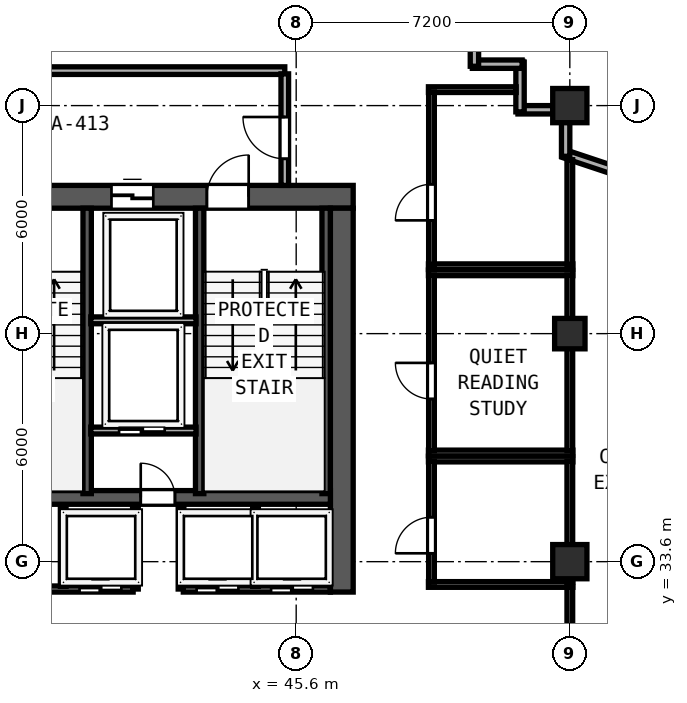
"""IFC4 building model, lengths in metres.
Left out: names, types, materials, properties, quantities, classifications, styles, units other than length and angle.
Written with IfcOpenShell. Run it as: python <this file> out.ifc"""

import sys

from ifc_helpers import new_model, si_unit, direction, frame, frame_2d, origin, origin_2d, place, context, subcontext, project, spatial, rectangle, hollow_rectangle, extrude, element, fill, save


model = new_model("IFC4")
c1 = context("Model", 3, precision=1e-05, world=origin(), true_north=direction((0.0, 1.0)))
c2 = subcontext(c1, "Body", "Model", "MODEL_VIEW")
j1 = project(units=[si_unit("LENGTHUNIT", "METRE"), si_unit("PLANEANGLEUNIT", "RADIAN")], contexts=[c1])
p1 = place(None, origin())
s1 = spatial("IfcSite", under=j1, at=p1, CompositionType="ELEMENT")
p2 = place(p1, origin())
s2 = spatial("IfcBuilding", under=s1, at=p2, CompositionType="ELEMENT")
p3 = place(p2, frame((0.0, 0.0, 191.8)))
s3 = spatial("IfcBuildingStorey", under=s2, at=p3, CompositionType="ELEMENT", Elevation=191.8)
p4 = place(p3, frame((29.7, 43.2, 0.0), z_axis=(0.0, 0.0, 1.0), x_axis=(1.0, 0.0, 0.0)))
e1 = element("IfcWall", 1, at=p4, inside=s3, PredefinedType="SHEAR", context=c2, shape_type="SweptSolid", body=[
    extrude(rectangle(XDim=17.4, YDim=0.6, at=frame_2d((8.7, 0.0))), origin(), (0.0, 0.0, 1.0), 3.62),
])
p5 = place(p4, frame((2.35, 0.0, 0.0)))
e2 = element("IfcOpeningElement", 2, at=p5, cuts=e1, PredefinedType="OPENING", context=c2, shape_type="SweptSolid", body=[
    extrude(rectangle(XDim=1.1, YDim=2.15, at=frame_2d((0.55, 1.075))), frame((0.0, 0.31, 0.0), z_axis=(0.0, -1.0, 0.0), x_axis=(1.0, 0.0, 0.0)), (0.0, 0.0, 1.0), 0.62),
])
p6 = place(p4, frame((7.46, 0.0, 0.0)))
e3 = element("IfcOpeningElement", 3, at=p6, cuts=e1, PredefinedType="OPENING", context=c2, shape_type="SweptSolid", body=[
    extrude(rectangle(XDim=1.1, YDim=2.15, at=frame_2d((0.55, 1.075))), frame((0.0, 0.31, 0.0), z_axis=(0.0, -1.0, 0.0), x_axis=(1.0, 0.0, 0.0)), (0.0, 0.0, 1.0), 0.62),
])
p7 = place(p4, frame((13.55, 0.0, 0.0)))
e4 = element("IfcOpeningElement", 4, at=p7, cuts=e1, PredefinedType="OPENING", context=c2, shape_type="SweptSolid", body=[
    extrude(rectangle(XDim=1.1, YDim=2.15, at=frame_2d((0.55, 1.075))), frame((0.0, 0.31, 0.0), z_axis=(0.0, -1.0, 0.0), x_axis=(1.0, 0.0, 0.0)), (0.0, 0.0, 1.0), 0.62),
])
p8 = place(p4, frame((4.68, 0.0, 0.0)))
e5 = element("IfcOpeningElement", 5, at=p8, cuts=e1, PredefinedType="OPENING", context=c2, shape_type="SweptSolid", body=[
    extrude(rectangle(XDim=1.1, YDim=2.2, at=frame_2d((0.55, 1.1))), frame((0.0, 0.31, 0.0), z_axis=(0.0, -1.0, 0.0), x_axis=(1.0, 0.0, 0.0)), (0.0, 0.0, 1.0), 0.62),
])
p9 = place(p4, frame((11.04, 0.0, 0.0)))
e6 = element("IfcOpeningElement", 6, at=p9, cuts=e1, PredefinedType="OPENING", context=c2, shape_type="SweptSolid", body=[
    extrude(rectangle(XDim=1.1, YDim=2.2, at=frame_2d((0.55, 1.1))), frame((0.0, 0.31, 0.0), z_axis=(0.0, -1.0, 0.0), x_axis=(1.0, 0.0, 0.0)), (0.0, 0.0, 1.0), 0.62),
])
p10 = place(p3, frame((46.8, 32.8, 0.0), z_axis=(0.0, 0.0, 1.0), x_axis=(0.0, 1.0, 0.0)))
e7 = element("IfcWall", 7, at=p10, inside=s3, PredefinedType="SHEAR", context=c2, shape_type="SweptSolid", body=[
    extrude(rectangle(XDim=10.1, YDim=0.6, at=frame_2d((5.05, 0.0))), origin(), (0.0, 0.0, 1.0), 3.62),
])
p11 = place(p3, frame((30.3, 35.29, 0.0), z_axis=(0.0, 0.0, 1.0), x_axis=(1.0, 0.0, 0.0)))
e8 = element("IfcWall", 8, at=p11, inside=s3, PredefinedType="SHEAR", context=c2, shape_type="SweptSolid", body=[
    extrude(rectangle(XDim=16.2, YDim=0.36, at=frame_2d((8.1, 0.0))), origin(), (0.0, 0.0, 1.0), 3.62),
])
p12 = place(p11, frame((5.05, 0.0, 0.0), z_axis=(0.0, 0.0, 1.0), x_axis=(-1.0, 0.0, 0.0)))
e9 = element("IfcOpeningElement", 9, at=p12, cuts=e8, PredefinedType="OPENING", context=c2, shape_type="SweptSolid", body=[
    extrude(rectangle(XDim=0.9, YDim=2.1, at=frame_2d((0.45, 1.05))), frame((0.0, 0.19, 0.0), z_axis=(0.0, -1.0, 0.0), x_axis=(1.0, 0.0, 0.0)), (0.0, 0.0, 1.0), 0.38),
])
p13 = place(p11, frame((12.11, 0.0, 0.0), z_axis=(0.0, 0.0, 1.0), x_axis=(-1.0, 0.0, 0.0)))
e10 = element("IfcOpeningElement", 10, at=p13, cuts=e8, PredefinedType="OPENING", context=c2, shape_type="SweptSolid", body=[
    extrude(rectangle(XDim=0.9, YDim=2.1, at=frame_2d((0.45, 1.05))), frame((0.0, 0.19, 0.0), z_axis=(0.0, -1.0, 0.0), x_axis=(1.0, 0.0, 0.0)), (0.0, 0.0, 1.0), 0.38),
])
for number, where, z_axis, x_axis in (
    (11, (40.1, 35.39, 0.0), (0.0, 0.0, 1.0), (0.0, 1.0, 0.0)),
    (12, (43.06, 35.39, 0.0), (0.0, 0.0, 1.0), (0.0, 1.0, 0.0)),
    (13, (46.388, 35.39, 0.0), (0.0, 0.0, 1.0), (0.0, 1.0, 0.0)),
):
    element("IfcWall", number, at=place(p3, frame(where, z_axis=z_axis, x_axis=x_axis)), inside=s3, PredefinedType="SHEAR", context=c2, shape_type="SweptSolid", body=[
        extrude(rectangle(XDim=7.51, YDim=0.22, at=frame_2d((3.755, 0.0))), origin(), (0.0, 0.0, 1.0), 3.62),
    ])
for number, where, z_axis, x_axis in (
    (14, (52.8, 33.6, 0.0), (0.0, 0.0, 1.0), (1.0, 0.0, 0.0)),
    (15, (52.8, 45.6, 0.0), (0.0, 0.0, 1.0), (1.0, 0.0, 0.0)),
):
    element("IfcColumn", number, at=place(p3, frame(where, z_axis=z_axis, x_axis=x_axis)), inside=s3, PredefinedType="COLUMN", context=c2, shape_type="SweptSolid", body=[
        extrude(hollow_rectangle(XDim=0.9, YDim=0.9, WallThickness=0.034, at=origin_2d()), origin(), (0.0, 0.0, 1.0), 3.8),
    ])
p14 = place(p3, frame((52.8, 39.6, 0.0), z_axis=(0.0, 0.0, 1.0), x_axis=(1.0, 0.0, 0.0)))
e16 = element("IfcColumn", 16, at=p14, inside=s3, PredefinedType="COLUMN", context=c2, shape_type="SweptSolid", body=[
    extrude(hollow_rectangle(XDim=0.8, YDim=0.8, WallThickness=0.03, at=origin_2d()), origin(), (0.0, 0.0, 1.0), 3.8),
])
p15 = place(p3, frame((58.476, 42.392, 0.0), z_axis=(0.0, 0.0, 1.0), x_axis=(-0.948691231611, 0.316203964339, 0.0)))
e17 = element("IfcWall", 17, at=p15, inside=s3, PredefinedType="SOLIDWALL", context=c2, shape_type="SweptSolid", body=[
    extrude(rectangle(XDim=6.154, YDim=0.22, at=frame_2d((3.077, 0.0))), origin(), (0.0, 0.0, 1.0), 3.215),
])
p16 = place(p15, frame((0.419, 0.0, 0.85)))
e18 = element("IfcOpeningElement", 18, at=p16, cuts=e17, PredefinedType="OPENING", context=c2, shape_type="SweptSolid", body=[
    extrude(rectangle(XDim=1.1, YDim=1.75, at=frame_2d((0.55, 0.875))), frame((0.0, 0.12, 0.0), z_axis=(0.0, -1.0, 0.0), x_axis=(1.0, 0.0, 0.0)), (0.0, 0.0, 1.0), 0.24),
])
p17 = place(p3, frame((52.69, 44.266, 0.0), z_axis=(0.0, 0.0, 1.0), x_axis=(0.0, 1.0, 0.0)))
e19 = element("IfcWall", 19, at=p17, inside=s3, PredefinedType="SOLIDWALL", context=c2, shape_type="SweptSolid", body=[
    extrude(rectangle(XDim=0.892, YDim=0.22, at=frame_2d((0.446, 0.0))), origin(), (0.0, 0.0, 1.0), 3.215),
])
p18 = place(p3, frame((52.358, 45.49, 0.0), z_axis=(0.0, 0.0, 1.0), x_axis=(-1.0, 0.0, 0.0)))
e20 = element("IfcWall", 20, at=p18, inside=s3, PredefinedType="SOLIDWALL", context=c2, shape_type="SweptSolid", body=[
    extrude(rectangle(XDim=0.923, YDim=0.22, at=frame_2d((0.461, 0.0))), origin(), (0.0, 0.0, 1.0), 3.62),
])
p19 = place(p3, frame((51.49, 45.435, 0.0), z_axis=(0.0, 0.0, 1.0), x_axis=(0.0, 1.0, 0.0)))
e21 = element("IfcWall", 21, at=p19, inside=s3, PredefinedType="SOLIDWALL", context=c2, shape_type="SweptSolid", body=[
    extrude(rectangle(XDim=1.31, YDim=0.22, at=frame_2d((0.655, 0.0))), origin(), (0.0, 0.0, 1.0), 3.62),
])
p20 = place(p3, frame((51.545, 46.69, 0.0), z_axis=(0.0, 0.0, 1.0), x_axis=(-1.0, 0.0, 0.0)))
e22 = element("IfcWall", 22, at=p20, inside=s3, PredefinedType="SOLIDWALL", context=c2, shape_type="SweptSolid", body=[
    extrude(rectangle(XDim=1.31, YDim=0.22, at=frame_2d((0.655, 0.0))), origin(), (0.0, 0.0, 1.0), 3.62),
])
p21 = place(p3, frame((50.29, 46.635, 0.0), z_axis=(0.0, 0.0, 1.0), x_axis=(0.0, 1.0, 0.0)))
e23 = element("IfcWall", 23, at=p21, inside=s3, PredefinedType="SOLIDWALL", context=c2, shape_type="SweptSolid", body=[
    extrude(rectangle(XDim=1.535, YDim=0.22, at=frame_2d((0.768, 0.0))), origin(), (0.0, 0.0, 1.0), 3.62),
])
p22 = place(p3, frame((31.5, 46.52, 0.0), z_axis=(0.0, 0.0, 1.0), x_axis=(1.0, 0.0, 0.0)))
e24 = element("IfcWall", 24, at=p22, inside=s3, PredefinedType="SOLIDWALL", context=c2, shape_type="SweptSolid", body=[
    extrude(rectangle(XDim=13.8, YDim=0.2, at=frame_2d((6.9, 0.0))), origin(), (0.0, 0.0, 1.0), 3.62),
])
p23 = place(p3, frame((45.3, 43.5, 0.0), z_axis=(0.0, 0.0, 1.0), x_axis=(0.0, 1.0, 0.0)))
e25 = element("IfcWall", 25, at=p23, inside=s3, PredefinedType="SOLIDWALL", context=c2, shape_type="SweptSolid", body=[
    extrude(rectangle(XDim=2.935, YDim=0.2, at=frame_2d((1.468, 0.0))), origin(), (0.0, 0.0, 1.0), 3.62),
])
p24 = place(p23, frame((0.7, 0.0, 0.0)))
e26 = element("IfcOpeningElement", 26, at=p24, cuts=e25, PredefinedType="OPENING", context=c2, shape_type="SweptSolid", body=[
    extrude(rectangle(XDim=1.1, YDim=2.15, at=frame_2d((0.55, 1.075))), frame((0.0, 0.11, 0.0), z_axis=(0.0, -1.0, 0.0), x_axis=(1.0, 0.0, 0.0)), (0.0, 0.0, 1.0), 0.22),
])
p25 = place(p3, frame((40.195, 39.95, 0.0), z_axis=(0.0, 0.0, 1.0), x_axis=(1.0, 0.0, 0.0)))
e27 = element("IfcWall", 27, at=p25, inside=s3, PredefinedType="SOLIDWALL", context=c2, shape_type="SweptSolid", body=[
    extrude(rectangle(XDim=2.77, YDim=0.18, at=frame_2d((1.385, 0.0))), origin(), (0.0, 0.0, 1.0), 3.62),
])
p26 = place(p3, frame((40.195, 37.05, 0.0), z_axis=(0.0, 0.0, 1.0), x_axis=(1.0, 0.0, 0.0)))
e28 = element("IfcWall", 28, at=p26, inside=s3, PredefinedType="SOLIDWALL", context=c2, shape_type="SweptSolid", body=[
    extrude(rectangle(XDim=2.77, YDim=0.18, at=frame_2d((1.385, 0.0))), origin(), (0.0, 0.0, 1.0), 3.62),
])
p27 = place(p26, frame((1.945, 0.0, 0.0), z_axis=(0.0, 0.0, 1.0), x_axis=(-1.0, 0.0, 0.0)))
e29 = element("IfcOpeningElement", 29, at=p27, cuts=e28, PredefinedType="OPENING", context=c2, shape_type="SweptSolid", body=[
    extrude(rectangle(XDim=1.2, YDim=2.2, at=frame_2d((0.6, 1.1))), frame((0.0, 0.1, 0.0), z_axis=(0.0, -1.0, 0.0), x_axis=(1.0, 0.0, 0.0)), (0.0, 0.0, 1.0), 0.2),
])
for number, where, z_axis, x_axis in (
    (30, (41.37, 32.88, 0.0), (0.0, 0.0, 1.0), (0.0, 1.0, 0.0)),
    (31, (42.57, 32.88, 0.0), (0.0, 0.0, 1.0), (0.0, 1.0, 0.0)),
):
    element("IfcWall", number, at=place(p3, frame(where, z_axis=z_axis, x_axis=x_axis)), inside=s3, PredefinedType="SOLIDWALL", context=c2, shape_type="SweptSolid", body=[
        extrude(rectangle(XDim=2.17, YDim=0.15, at=frame_2d((1.085, 0.0))), origin(), (0.0, 0.0, 1.0), 3.62),
    ])
p28 = place(p3, frame((35.57, 32.88, 0.0), z_axis=(0.0, 0.0, 1.0), x_axis=(1.0, 0.0, 0.0)))
e32 = element("IfcWall", 32, at=p28, inside=s3, PredefinedType="SOLIDWALL", context=c2, shape_type="SweptSolid", body=[
    extrude(rectangle(XDim=5.74, YDim=0.16, at=frame_2d((2.87, 0.0))), origin(), (0.0, 0.0, 1.0), 3.62),
])
p29 = place(p28, frame((1.49, 0.0, 0.0), z_axis=(0.0, 0.0, 1.0), x_axis=(-1.0, 0.0, 0.0)))
e33 = element("IfcOpeningElement", 33, at=p29, cuts=e32, PredefinedType="OPENING", context=c2, shape_type="SweptSolid", body=[
    extrude(rectangle(XDim=0.95, YDim=2.12, at=frame_2d((0.475, 1.06))), frame((0.0, 0.09, 0.0), z_axis=(0.0, -1.0, 0.0), x_axis=(1.0, 0.0, 0.0)), (0.0, 0.0, 1.0), 0.18),
])
p30 = place(p28, frame((5.43, 0.0, 0.0), z_axis=(0.0, 0.0, 1.0), x_axis=(-1.0, 0.0, 0.0)))
e34 = element("IfcOpeningElement", 34, at=p30, cuts=e32, PredefinedType="OPENING", context=c2, shape_type="SweptSolid", body=[
    extrude(rectangle(XDim=1.1, YDim=2.2, at=frame_2d((0.55, 1.1))), frame((0.0, 0.09, 0.0), z_axis=(0.0, -1.0, 0.0), x_axis=(1.0, 0.0, 0.0)), (0.0, 0.0, 1.0), 0.18),
])
p31 = place(p3, frame((42.63, 32.88, 0.0), z_axis=(0.0, 0.0, 1.0), x_axis=(1.0, 0.0, 0.0)))
e35 = element("IfcWall", 35, at=p31, inside=s3, PredefinedType="SOLIDWALL", context=c2, shape_type="SweptSolid", body=[
    extrude(rectangle(XDim=3.87, YDim=0.16, at=frame_2d((1.935, 0.0))), origin(), (0.0, 0.0, 1.0), 3.62),
])
p32 = place(p31, frame((1.45, 0.0, 0.0), z_axis=(0.0, 0.0, 1.0), x_axis=(-1.0, 0.0, 0.0)))
e36 = element("IfcOpeningElement", 36, at=p32, cuts=e35, PredefinedType="OPENING", context=c2, shape_type="SweptSolid", body=[
    extrude(rectangle(XDim=1.1, YDim=2.2, at=frame_2d((0.55, 1.1))), frame((0.0, 0.09, 0.0), z_axis=(0.0, -1.0, 0.0), x_axis=(1.0, 0.0, 0.0)), (0.0, 0.0, 1.0), 0.18),
])
p33 = place(p31, frame((3.41, 0.0, 0.0), z_axis=(0.0, 0.0, 1.0), x_axis=(-1.0, 0.0, 0.0)))
e37 = element("IfcOpeningElement", 37, at=p33, cuts=e35, PredefinedType="OPENING", context=c2, shape_type="SweptSolid", body=[
    extrude(rectangle(XDim=1.1, YDim=2.2, at=frame_2d((0.55, 1.1))), frame((0.0, 0.09, 0.0), z_axis=(0.0, -1.0, 0.0), x_axis=(1.0, 0.0, 0.0)), (0.0, 0.0, 1.0), 0.18),
])
for number, where, z_axis, x_axis in (
    (38, (39.47, 32.95, 0.0), (0.0, 0.0, 1.0), (0.0, 1.0, 0.0)),
    (39, (44.53, 32.95, 0.0), (0.0, 0.0, 1.0), (0.0, 1.0, 0.0)),
):
    element("IfcWall", number, at=place(p3, frame(where, z_axis=z_axis, x_axis=x_axis)), inside=s3, PredefinedType="SOLIDWALL", context=c2, shape_type="SweptSolid", body=[
        extrude(rectangle(XDim=2.05, YDim=0.15, at=frame_2d((1.025, 0.0))), origin(), (0.0, 0.0, 1.0), 3.62),
    ])
for number, where, z_axis, x_axis in (
    (40, (49.08, 36.3, 0.0), (0.0, 0.0, 1.0), (1.0, 0.0, 0.0)),
    (41, (49.08, 33.0, 0.0), (0.0, 0.0, 1.0), (1.0, 0.0, 0.0)),
):
    element("IfcWall", number, at=place(p3, frame(where, z_axis=z_axis, x_axis=x_axis)), inside=s3, PredefinedType="PARTITIONING", context=c2, shape_type="SweptSolid", body=[
        extrude(rectangle(XDim=3.8, YDim=0.15, at=frame_2d((1.9, 0.0))), origin(), (0.0, 0.0, 1.0), 3.62),
    ])
p34 = place(p3, frame((49.16, 33.06, 0.0), z_axis=(0.0, 0.0, 1.0), x_axis=(0.0, 1.0, 0.0)))
e42 = element("IfcWall", 42, at=p34, inside=s3, PredefinedType="PARTITIONING", context=c2, shape_type="SweptSolid", body=[
    extrude(rectangle(XDim=3.18, YDim=0.15, at=frame_2d((1.59, 0.0))), origin(), (0.0, 0.0, 1.0), 3.62),
])
p35 = place(p34, frame((0.76, 0.0, 0.0)))
e43 = element("IfcOpeningElement", 43, at=p35, cuts=e42, PredefinedType="OPENING", context=c2, shape_type="SweptSolid", body=[
    extrude(rectangle(XDim=0.95, YDim=2.12, at=frame_2d((0.475, 1.06))), frame((0.0, 0.085, 0.0), z_axis=(0.0, -1.0, 0.0), x_axis=(1.0, 0.0, 0.0)), (0.0, 0.0, 1.0), 0.17),
])
p36 = place(p3, frame((52.8, 33.06, 0.0), z_axis=(0.0, 0.0, 1.0), x_axis=(0.0, 1.0, 0.0)))
e44 = element("IfcWall", 44, at=p36, inside=s3, PredefinedType="PARTITIONING", context=c2, shape_type="SweptSolid", body=[
    extrude(rectangle(XDim=3.18, YDim=0.15, at=frame_2d((1.59, 0.0))), origin(), (0.0, 0.0, 1.0), 3.215),
])
for number, where, z_axis, x_axis in (
    (45, (49.08, 41.2, 0.0), (0.0, 0.0, 1.0), (1.0, 0.0, 0.0)),
    (46, (49.08, 36.46, 0.0), (0.0, 0.0, 1.0), (1.0, 0.0, 0.0)),
):
    element("IfcWall", number, at=place(p3, frame(where, z_axis=z_axis, x_axis=x_axis)), inside=s3, PredefinedType="PARTITIONING", context=c2, shape_type="SweptSolid", body=[
        extrude(rectangle(XDim=3.8, YDim=0.15, at=frame_2d((1.9, 0.0))), origin(), (0.0, 0.0, 1.0), 3.62),
    ])
p37 = place(p3, frame((49.16, 36.52, 0.0), z_axis=(0.0, 0.0, 1.0), x_axis=(0.0, 1.0, 0.0)))
e47 = element("IfcWall", 47, at=p37, inside=s3, PredefinedType="PARTITIONING", context=c2, shape_type="SweptSolid", body=[
    extrude(rectangle(XDim=4.62, YDim=0.15, at=frame_2d((2.31, 0.0))), origin(), (0.0, 0.0, 1.0), 3.62),
])
p38 = place(p37, frame((1.36, 0.0, 0.0)))
e48 = element("IfcOpeningElement", 48, at=p38, cuts=e47, PredefinedType="OPENING", context=c2, shape_type="SweptSolid", body=[
    extrude(rectangle(XDim=0.95, YDim=2.12, at=frame_2d((0.475, 1.06))), frame((0.0, 0.085, 0.0), z_axis=(0.0, -1.0, 0.0), x_axis=(1.0, 0.0, 0.0)), (0.0, 0.0, 1.0), 0.17),
])
p39 = place(p3, frame((52.8, 36.52, 0.0), z_axis=(0.0, 0.0, 1.0), x_axis=(0.0, 1.0, 0.0)))
e49 = element("IfcWall", 49, at=p39, inside=s3, PredefinedType="PARTITIONING", context=c2, shape_type="SweptSolid", body=[
    extrude(rectangle(XDim=4.62, YDim=0.15, at=frame_2d((2.31, 0.0))), origin(), (0.0, 0.0, 1.0), 3.215),
])
p40 = place(p3, frame((49.08, 46.02, 0.0), z_axis=(0.0, 0.0, 1.0), x_axis=(1.0, 0.0, 0.0)))
e50 = element("IfcWall", 50, at=p40, inside=s3, PredefinedType="PARTITIONING", context=c2, shape_type="SweptSolid", body=[
    extrude(rectangle(XDim=2.308, YDim=0.15, at=frame_2d((1.154, 0.0))), origin(), (0.0, 0.0, 1.0), 3.62),
])
p41 = place(p3, frame((49.08, 41.36, 0.0), z_axis=(0.0, 0.0, 1.0), x_axis=(1.0, 0.0, 0.0)))
e51 = element("IfcWall", 51, at=p41, inside=s3, PredefinedType="PARTITIONING", context=c2, shape_type="SweptSolid", body=[
    extrude(rectangle(XDim=3.8, YDim=0.15, at=frame_2d((1.9, 0.0))), origin(), (0.0, 0.0, 1.0), 3.62),
])
p42 = place(p3, frame((49.16, 41.42, 0.0), z_axis=(0.0, 0.0, 1.0), x_axis=(0.0, 1.0, 0.0)))
e52 = element("IfcWall", 52, at=p42, inside=s3, PredefinedType="PARTITIONING", context=c2, shape_type="SweptSolid", body=[
    extrude(rectangle(XDim=4.54, YDim=0.15, at=frame_2d((2.27, 0.0))), origin(), (0.0, 0.0, 1.0), 3.62),
])
p43 = place(p42, frame((1.16, 0.0, 0.0)))
e53 = element("IfcOpeningElement", 53, at=p43, cuts=e52, PredefinedType="OPENING", context=c2, shape_type="SweptSolid", body=[
    extrude(rectangle(XDim=0.95, YDim=2.12, at=frame_2d((0.475, 1.06))), frame((0.0, 0.085, 0.0), z_axis=(0.0, -1.0, 0.0), x_axis=(1.0, 0.0, 0.0)), (0.0, 0.0, 1.0), 0.17),
])
p44 = place(p3, frame((52.8, 41.42, 0.0), z_axis=(0.0, 0.0, 1.0), x_axis=(0.0, 1.0, 0.0)))
e54 = element("IfcWall", 54, at=p44, inside=s3, PredefinedType="PARTITIONING", context=c2, shape_type="SweptSolid", body=[
    extrude(rectangle(XDim=2.757, YDim=0.15, at=frame_2d((1.378, 0.0))), origin(), (0.0, 0.0, 1.0), 3.215),
])
p45 = place(p3, frame((52.8, 26.34, 0.0), z_axis=(0.0, 0.0, 1.0), x_axis=(0.0, 1.0, 0.0)))
e55 = element("IfcWall", 55, at=p45, inside=s3, PredefinedType="PARTITIONING", context=c2, shape_type="SweptSolid", body=[
    extrude(rectangle(XDim=6.6, YDim=0.15, at=frame_2d((3.3, 0.0))), origin(), (0.0, 0.0, 1.0), 3.215),
])
p46 = place(p7, origin())
e56 = element("IfcDoor", 56, at=p46, inside=s3, OperationType="SINGLE_SWING_RIGHT", PredefinedType="DOOR", context=c2, shape_type="SweptSolid", body=[
    extrude(rectangle(XDim=1.1, YDim=2.15, at=frame_2d((0.55, 1.075))), frame((0.0, 0.185, 0.0), z_axis=(0.0, -1.0, 0.0), x_axis=(1.0, 0.0, 0.0)), (0.0, 0.0, 1.0), 0.05),
])
fill(e4, e56)
p47 = place(p24, origin())
e57 = element("IfcDoor", 57, at=p47, inside=s3, OperationType="SINGLE_SWING_RIGHT", PredefinedType="DOOR", context=c2, shape_type="SweptSolid", body=[
    extrude(rectangle(XDim=1.1, YDim=2.15, at=frame_2d((0.55, 1.075))), frame((0.0, 0.025, 0.0), z_axis=(0.0, -1.0, 0.0), x_axis=(1.0, 0.0, 0.0)), (0.0, 0.0, 1.0), 0.05),
])
fill(e26, e57)
p48 = place(p9, origin())
e58 = element("IfcDoor", 58, at=p48, inside=s3, OperationType="SLIDING_TO_LEFT", PredefinedType="DOOR", context=c2, shape_type="SweptSolid", body=[
    extrude(rectangle(XDim=1.1, YDim=2.2, at=frame_2d((0.55, 1.1))), frame((0.0, 0.185, 0.0), z_axis=(0.0, -1.0, 0.0), x_axis=(1.0, 0.0, 0.0)), (0.0, 0.0, 1.0), 0.05),
])
fill(e6, e58)
p49 = place(p27, origin())
e59 = element("IfcDoor", 59, at=p49, inside=s3, OperationType="SLIDING_TO_RIGHT", PredefinedType="DOOR", context=c2, shape_type="SweptSolid", body=[
    extrude(rectangle(XDim=1.2, YDim=2.2, at=frame_2d((0.6, 1.1))), frame((0.0, 0.025, 0.0), z_axis=(0.0, -1.0, 0.0), x_axis=(1.0, 0.0, 0.0)), (0.0, 0.0, 1.0), 0.05),
])
fill(e29, e59)
p50 = place(p13, origin())
e60 = element("IfcDoor", 60, at=p50, inside=s3, OperationType="SINGLE_SWING_RIGHT", PredefinedType="DOOR", context=c2, shape_type="SweptSolid", body=[
    extrude(rectangle(XDim=0.9, YDim=2.1, at=frame_2d((0.45, 1.05))), frame((0.0, 0.025, 0.0), z_axis=(0.0, -1.0, 0.0), x_axis=(1.0, 0.0, 0.0)), (0.0, 0.0, 1.0), 0.05),
])
fill(e10, e60)
p51 = place(p30, origin())
e61 = element("IfcDoor", 61, at=p51, inside=s3, OperationType="SLIDING_TO_RIGHT", PredefinedType="DOOR", context=c2, shape_type="SweptSolid", body=[
    extrude(rectangle(XDim=1.1, YDim=2.2, at=frame_2d((0.55, 1.1))), frame((0.0, 0.025, 0.0), z_axis=(0.0, -1.0, 0.0), x_axis=(1.0, 0.0, 0.0)), (0.0, 0.0, 1.0), 0.05),
])
fill(e34, e61)
p52 = place(p32, origin())
e62 = element("IfcDoor", 62, at=p52, inside=s3, OperationType="SLIDING_TO_RIGHT", PredefinedType="DOOR", context=c2, shape_type="SweptSolid", body=[
    extrude(rectangle(XDim=1.1, YDim=2.2, at=frame_2d((0.55, 1.1))), frame((0.0, 0.025, 0.0), z_axis=(0.0, -1.0, 0.0), x_axis=(1.0, 0.0, 0.0)), (0.0, 0.0, 1.0), 0.05),
])
fill(e36, e62)
p53 = place(p33, origin())
e63 = element("IfcDoor", 63, at=p53, inside=s3, OperationType="SLIDING_TO_RIGHT", PredefinedType="DOOR", context=c2, shape_type="SweptSolid", body=[
    extrude(rectangle(XDim=1.1, YDim=2.2, at=frame_2d((0.55, 1.1))), frame((0.0, 0.025, 0.0), z_axis=(0.0, -1.0, 0.0), x_axis=(1.0, 0.0, 0.0)), (0.0, 0.0, 1.0), 0.05),
])
fill(e37, e63)
p54 = place(p35, origin())
e64 = element("IfcDoor", 64, at=p54, inside=s3, OperationType="SINGLE_SWING_LEFT", PredefinedType="DOOR", context=c2, shape_type="SweptSolid", body=[
    extrude(rectangle(XDim=0.95, YDim=2.12, at=frame_2d((0.475, 1.06))), frame((0.0, 0.025, 0.0), z_axis=(0.0, -1.0, 0.0), x_axis=(1.0, 0.0, 0.0)), (0.0, 0.0, 1.0), 0.05),
])
fill(e43, e64)
p55 = place(p38, origin())
e65 = element("IfcDoor", 65, at=p55, inside=s3, OperationType="SINGLE_SWING_RIGHT", PredefinedType="DOOR", context=c2, shape_type="SweptSolid", body=[
    extrude(rectangle(XDim=0.95, YDim=2.12, at=frame_2d((0.475, 1.06))), frame((0.0, 0.025, 0.0), z_axis=(0.0, -1.0, 0.0), x_axis=(1.0, 0.0, 0.0)), (0.0, 0.0, 1.0), 0.05),
])
fill(e48, e65)
p56 = place(p43, origin())
e66 = element("IfcDoor", 66, at=p56, inside=s3, OperationType="SINGLE_SWING_LEFT", PredefinedType="DOOR", context=c2, shape_type="SweptSolid", body=[
    extrude(rectangle(XDim=0.95, YDim=2.12, at=frame_2d((0.475, 1.06))), frame((0.0, 0.025, 0.0), z_axis=(0.0, -1.0, 0.0), x_axis=(1.0, 0.0, 0.0)), (0.0, 0.0, 1.0), 0.05),
])
fill(e53, e66)
save(model, sys.argv[1])
